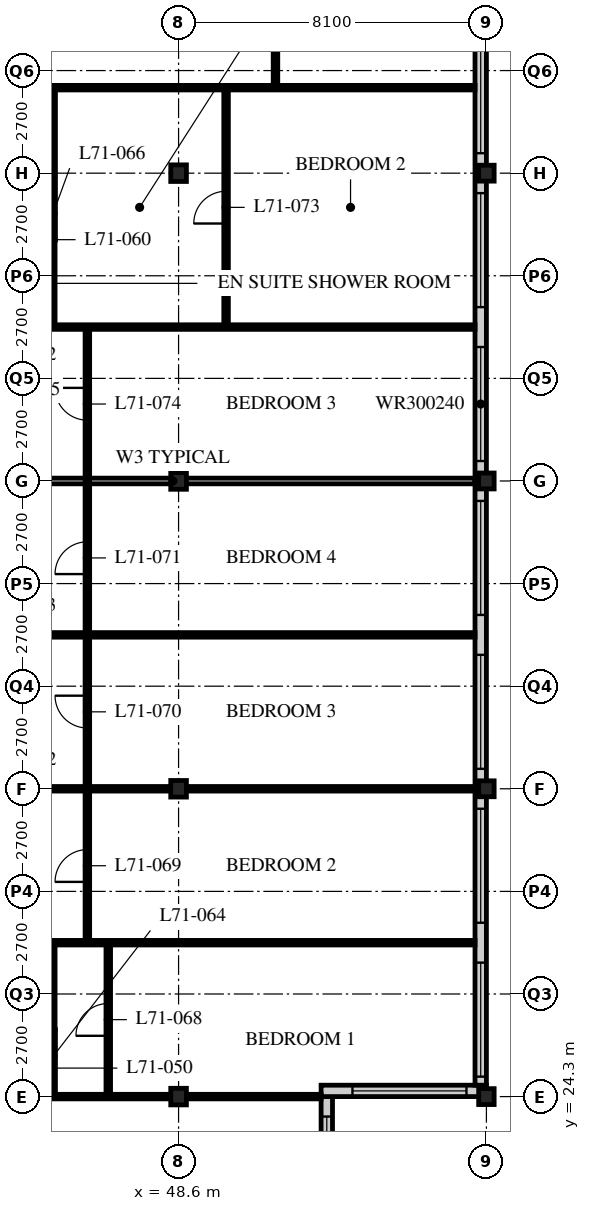
"""IFC4 building model, lengths in metres.
Left out: names, types, materials, properties, quantities, classifications, styles, units other than length and angle.
Written with IfcOpenShell. Run it as: python <this file> out.ifc"""

import sys

from ifc_helpers import new_model, si_unit, direction, frame, frame_2d, origin, origin_2d, place, context, subcontext, project, spatial, rectangle, i_section, extrude, element, fill, save


model = new_model("IFC4")
c1 = context("Model", 3, precision=1e-05, world=origin(), true_north=direction((0.0, 1.0)))
c2 = subcontext(c1, "Body", "Model", "MODEL_VIEW")
j1 = project(units=[si_unit("LENGTHUNIT", "METRE"), si_unit("PLANEANGLEUNIT", "RADIAN")], contexts=[c1])
p1 = place(None, origin())
s1 = spatial("IfcSite", under=j1, at=p1, CompositionType="ELEMENT")
p2 = place(p1, origin())
s2 = spatial("IfcBuilding", under=s1, at=p2, CompositionType="ELEMENT")
p3 = place(p2, frame((0.0, 0.0, 277.5)))
s3 = spatial("IfcBuildingStorey", under=s2, at=p3, CompositionType="ELEMENT", Elevation=277.5)
for number, where, z_axis, x_axis in (
    (1, (48.6, 24.3, 0.0), (0.0, 0.0, 1.0), (1.0, 0.0, 0.0)),
    (2, (48.6, 32.4, 0.0), (0.0, 0.0, 1.0), (1.0, 0.0, 0.0)),
    (3, (48.6, 40.5, 0.0), (0.0, 0.0, 1.0), (1.0, 0.0, 0.0)),
    (4, (48.6, 48.6, 0.0), (0.0, 0.0, 1.0), (1.0, 0.0, 0.0)),
):
    element("IfcColumn", number, at=place(p3, frame(where, z_axis=z_axis, x_axis=x_axis)), inside=s3, PredefinedType="COLUMN", context=c2, shape_type="SweptSolid", body=[
        extrude(i_section(OverallWidth=0.412, OverallDepth=0.437, WebThickness=0.036, FlangeThickness=0.058, FilletRadius=0.015, at=origin_2d()), origin(), (0.0, 0.0, 1.0), 3.9),
    ])
for number, where, z_axis, x_axis in (
    (5, (56.7, 24.3, 0.0), (0.0, 0.0, 1.0), (1.0, 0.0, 0.0)),
    (6, (56.7, 32.4, 0.0), (0.0, 0.0, 1.0), (1.0, 0.0, 0.0)),
    (7, (56.7, 40.5, 0.0), (0.0, 0.0, 1.0), (1.0, 0.0, 0.0)),
    (8, (56.7, 48.6, 0.0), (0.0, 0.0, 1.0), (1.0, 0.0, 0.0)),
):
    element("IfcColumn", number, at=place(p3, frame(where, z_axis=z_axis, x_axis=x_axis)), inside=s3, PredefinedType="COLUMN", context=c2, shape_type="SweptSolid", body=[
        extrude(i_section(OverallWidth=0.407, OverallDepth=0.419, WebThickness=0.031, FlangeThickness=0.049, FilletRadius=0.015, at=origin_2d()), origin(), (0.0, 0.0, 1.0), 3.9),
    ])
p4 = place(p3, frame((52.5, 20.55, 0.0), z_axis=(0.0, 0.0, 1.0), x_axis=(0.0, 1.0, 0.0)))
e9 = element("IfcWall", 9, at=p4, inside=s3, PredefinedType="SOLIDWALL", context=c2, shape_type="SweptSolid", body=[
    extrude(rectangle(XDim=3.75, YDim=0.3, at=frame_2d((1.875, 0.0))), origin(), (0.0, 0.0, 1.0), 3.69),
])
p5 = place(p4, frame((0.225, 0.0, 0.6)))
e10 = element("IfcOpeningElement", 10, at=p5, cuts=e9, PredefinedType="OPENING", context=c2, shape_type="SweptSolid", body=[
    extrude(rectangle(XDim=3.0, YDim=2.3, at=frame_2d((1.5, 1.15))), frame((0.0, 0.16, 0.0), z_axis=(0.0, -1.0, 0.0), x_axis=(1.0, 0.0, 0.0)), (0.0, 0.0, 1.0), 0.32),
])
p6 = place(p3, frame((52.35, 24.45, 0.0), z_axis=(0.0, 0.0, 1.0), x_axis=(1.0, 0.0, 0.0)))
e11 = element("IfcWall", 11, at=p6, inside=s3, PredefinedType="SOLIDWALL", context=c2, shape_type="SweptSolid", body=[
    extrude(rectangle(XDim=4.35, YDim=0.3, at=frame_2d((2.175, 0.0))), origin(), (0.0, 0.0, 1.0), 3.69),
])
p7 = place(p6, frame((0.825, 0.0, 0.6)))
e12 = element("IfcOpeningElement", 12, at=p7, cuts=e11, PredefinedType="OPENING", context=c2, shape_type="SweptSolid", body=[
    extrude(rectangle(XDim=3.0, YDim=2.3, at=frame_2d((1.5, 1.15))), frame((0.0, 0.16, 0.0), z_axis=(0.0, -1.0, 0.0), x_axis=(1.0, 0.0, 0.0)), (0.0, 0.0, 1.0), 0.32),
])
p8 = place(p3, frame((56.55, 24.6, 0.0), z_axis=(0.0, 0.0, 1.0), x_axis=(0.0, 1.0, 0.0)))
e13 = element("IfcWall", 13, at=p8, inside=s3, PredefinedType="SOLIDWALL", context=c2, shape_type="SweptSolid", body=[
    extrude(rectangle(XDim=32.1, YDim=0.3, at=frame_2d((16.05, 0.0))), origin(), (0.0, 0.0, 1.0), 3.69),
])
p9 = place(p8, frame((0.225, 0.0, 0.6)))
e14 = element("IfcOpeningElement", 14, at=p9, cuts=e13, PredefinedType="OPENING", context=c2, shape_type="SweptSolid", body=[
    extrude(rectangle(XDim=3.0, YDim=2.4, at=frame_2d((1.5, 1.2))), frame((0.0, 0.16, 0.0), z_axis=(0.0, -1.0, 0.0), x_axis=(1.0, 0.0, 0.0)), (0.0, 0.0, 1.0), 0.32),
])
p10 = place(p8, frame((4.275, 0.0, 0.6)))
e15 = element("IfcOpeningElement", 15, at=p10, cuts=e13, PredefinedType="OPENING", context=c2, shape_type="SweptSolid", body=[
    extrude(rectangle(XDim=3.0, YDim=2.4, at=frame_2d((1.5, 1.2))), frame((0.0, 0.16, 0.0), z_axis=(0.0, -1.0, 0.0), x_axis=(1.0, 0.0, 0.0)), (0.0, 0.0, 1.0), 0.32),
])
p11 = place(p8, frame((8.325, 0.0, 0.6)))
e16 = element("IfcOpeningElement", 16, at=p11, cuts=e13, PredefinedType="OPENING", context=c2, shape_type="SweptSolid", body=[
    extrude(rectangle(XDim=3.0, YDim=2.4, at=frame_2d((1.5, 1.2))), frame((0.0, 0.16, 0.0), z_axis=(0.0, -1.0, 0.0), x_axis=(1.0, 0.0, 0.0)), (0.0, 0.0, 1.0), 0.32),
])
p12 = place(p8, frame((12.375, 0.0, 0.6)))
e17 = element("IfcOpeningElement", 17, at=p12, cuts=e13, PredefinedType="OPENING", context=c2, shape_type="SweptSolid", body=[
    extrude(rectangle(XDim=3.0, YDim=2.4, at=frame_2d((1.5, 1.2))), frame((0.0, 0.16, 0.0), z_axis=(0.0, -1.0, 0.0), x_axis=(1.0, 0.0, 0.0)), (0.0, 0.0, 1.0), 0.32),
])
p13 = place(p8, frame((16.425, 0.0, 0.6)))
e18 = element("IfcOpeningElement", 18, at=p13, cuts=e13, PredefinedType="OPENING", context=c2, shape_type="SweptSolid", body=[
    extrude(rectangle(XDim=3.0, YDim=2.4, at=frame_2d((1.5, 1.2))), frame((0.0, 0.16, 0.0), z_axis=(0.0, -1.0, 0.0), x_axis=(1.0, 0.0, 0.0)), (0.0, 0.0, 1.0), 0.32),
])
p14 = place(p8, frame((20.475, 0.0, 0.6)))
e19 = element("IfcOpeningElement", 19, at=p14, cuts=e13, PredefinedType="OPENING", context=c2, shape_type="SweptSolid", body=[
    extrude(rectangle(XDim=3.0, YDim=2.4, at=frame_2d((1.5, 1.2))), frame((0.0, 0.16, 0.0), z_axis=(0.0, -1.0, 0.0), x_axis=(1.0, 0.0, 0.0)), (0.0, 0.0, 1.0), 0.32),
])
p15 = place(p8, frame((24.525, 0.0, 0.6)))
e20 = element("IfcOpeningElement", 20, at=p15, cuts=e13, PredefinedType="OPENING", context=c2, shape_type="SweptSolid", body=[
    extrude(rectangle(XDim=3.0, YDim=2.4, at=frame_2d((1.5, 1.2))), frame((0.0, 0.16, 0.0), z_axis=(0.0, -1.0, 0.0), x_axis=(1.0, 0.0, 0.0)), (0.0, 0.0, 1.0), 0.32),
])
p16 = place(p8, frame((28.575, 0.0, 0.6)))
e21 = element("IfcOpeningElement", 21, at=p16, cuts=e13, PredefinedType="OPENING", context=c2, shape_type="SweptSolid", body=[
    extrude(rectangle(XDim=3.0, YDim=2.4, at=frame_2d((1.5, 1.2))), frame((0.0, 0.16, 0.0), z_axis=(0.0, -1.0, 0.0), x_axis=(1.0, 0.0, 0.0)), (0.0, 0.0, 1.0), 0.32),
])
p17 = place(p3, frame((42.9, 24.3, 0.0), z_axis=(0.0, 0.0, 1.0), x_axis=(1.0, 0.0, 0.0)))
e22 = element("IfcWall", 22, at=p17, inside=s3, PredefinedType="PARTITIONING", context=c2, shape_type="SweptSolid", body=[
    extrude(rectangle(XDim=9.45, YDim=0.12, at=frame_2d((4.725, 0.0))), origin(), (0.0, 0.0, 1.0), 3.078),
])
p18 = place(p3, frame((40.5, 40.5, 0.0), z_axis=(0.0, 0.0, 1.0), x_axis=(1.0, 0.0, 0.0)))
e23 = element("IfcWall", 23, at=p18, inside=s3, PredefinedType="PARTITIONING", context=c2, shape_type="SweptSolid", body=[
    extrude(rectangle(XDim=15.9, YDim=0.15, at=frame_2d((7.95, 0.0))), origin(), (0.0, 0.0, 1.0), 3.078),
])
p19 = place(p3, frame((42.9, 26.05, 0.0), z_axis=(0.0, 0.0, 1.0), x_axis=(1.0, 0.0, 0.0)))
e24 = element("IfcWall", 24, at=p19, inside=s3, PredefinedType="PARTITIONING", context=c2, shape_type="SweptSolid", body=[
    extrude(rectangle(XDim=2.4, YDim=0.1, at=frame_2d((1.2, 0.0))), origin(), (0.0, 0.0, 1.0), 3.69),
])
p20 = place(p19, frame((0.8, 0.0, 0.0)))
e25 = element("IfcOpeningElement", 25, at=p20, cuts=e24, PredefinedType="OPENING", context=c2, shape_type="SweptSolid", body=[
    extrude(rectangle(XDim=0.8, YDim=2.1, at=frame_2d((0.4, 1.05))), frame((0.0, 0.06, 0.0), z_axis=(0.0, -1.0, 0.0), x_axis=(1.0, 0.0, 0.0)), (0.0, 0.0, 1.0), 0.12),
])
p21 = place(p3, frame((45.3, 26.05, 0.0), z_axis=(0.0, 0.0, 1.0), x_axis=(0.0, 1.0, 0.0)))
e26 = element("IfcWall", 26, at=p21, inside=s3, PredefinedType="PARTITIONING", context=c2, shape_type="SweptSolid", body=[
    extrude(rectangle(XDim=2.3, YDim=0.1, at=frame_2d((1.15, 0.0))), origin(), (0.0, 0.0, 1.0), 3.69),
])
p22 = place(p3, frame((42.9, 28.35, 0.0), z_axis=(0.0, 0.0, 1.0), x_axis=(1.0, 0.0, 0.0)))
e27 = element("IfcWall", 27, at=p22, inside=s3, PredefinedType="PARTITIONING", context=c2, shape_type="SweptSolid", body=[
    extrude(rectangle(XDim=13.5, YDim=0.12, at=frame_2d((6.75, 0.0))), origin(), (0.0, 0.0, 1.0), 3.69),
])
p23 = place(p3, frame((42.9, 32.4, 0.0), z_axis=(0.0, 0.0, 1.0), x_axis=(1.0, 0.0, 0.0)))
e28 = element("IfcWall", 28, at=p23, inside=s3, PredefinedType="PARTITIONING", context=c2, shape_type="SweptSolid", body=[
    extrude(rectangle(XDim=13.5, YDim=0.12, at=frame_2d((6.75, 0.0))), origin(), (0.0, 0.0, 1.0), 3.078),
])
for number, where, z_axis, x_axis in (
    (29, (42.9, 36.45, 0.0), (0.0, 0.0, 1.0), (1.0, 0.0, 0.0)),
    (30, (42.9, 50.85, 0.0), (0.0, 0.0, 1.0), (1.0, 0.0, 0.0)),
):
    element("IfcWall", number, at=place(p3, frame(where, z_axis=z_axis, x_axis=x_axis)), inside=s3, PredefinedType="PARTITIONING", context=c2, shape_type="SweptSolid", body=[
        extrude(rectangle(XDim=13.5, YDim=0.12, at=frame_2d((6.75, 0.0))), origin(), (0.0, 0.0, 1.0), 3.69),
    ])
p24 = place(p3, frame((42.9, 46.85, 0.0), z_axis=(0.0, 0.0, 1.0), x_axis=(1.0, 0.0, 0.0)))
e31 = element("IfcWall", 31, at=p24, inside=s3, PredefinedType="PARTITIONING", context=c2, shape_type="SweptSolid", body=[
    extrude(rectangle(XDim=2.4, YDim=0.1, at=frame_2d((1.2, 0.0))), origin(), (0.0, 0.0, 1.0), 3.69),
])
p25 = place(p24, frame((0.8, 0.0, 0.0)))
e32 = element("IfcOpeningElement", 32, at=p25, cuts=e31, PredefinedType="OPENING", context=c2, shape_type="SweptSolid", body=[
    extrude(rectangle(XDim=0.8, YDim=2.1, at=frame_2d((0.4, 1.05))), frame((0.0, 0.06, 0.0), z_axis=(0.0, -1.0, 0.0), x_axis=(1.0, 0.0, 0.0)), (0.0, 0.0, 1.0), 0.12),
])
p26 = place(p3, frame((45.3, 46.85, 0.0), z_axis=(0.0, 0.0, 1.0), x_axis=(0.0, -1.0, 0.0)))
e33 = element("IfcWall", 33, at=p26, inside=s3, PredefinedType="PARTITIONING", context=c2, shape_type="SweptSolid", body=[
    extrude(rectangle(XDim=2.3, YDim=0.1, at=frame_2d((1.15, 0.0))), origin(), (0.0, 0.0, 1.0), 3.69),
])
p27 = place(p3, frame((42.9, 44.55, 0.0), z_axis=(0.0, 0.0, 1.0), x_axis=(1.0, 0.0, 0.0)))
e34 = element("IfcWall", 34, at=p27, inside=s3, PredefinedType="PARTITIONING", context=c2, shape_type="SweptSolid", body=[
    extrude(rectangle(XDim=13.5, YDim=0.12, at=frame_2d((6.75, 0.0))), origin(), (0.0, 0.0, 1.0), 3.69),
])
p28 = place(p3, frame((45.3, 24.3, 0.0), z_axis=(0.0, 0.0, 1.0), x_axis=(0.0, 1.0, 0.0)))
e35 = element("IfcWall", 35, at=p28, inside=s3, PredefinedType="PARTITIONING", context=c2, shape_type="SweptSolid", body=[
    extrude(rectangle(XDim=1.76, YDim=0.12, at=frame_2d((0.88, 0.0))), origin(), (0.0, 0.0, 1.0), 3.69),
])
p29 = place(p28, frame((0.635, 0.0, 0.0)))
e36 = element("IfcOpeningElement", 36, at=p29, cuts=e35, PredefinedType="OPENING", context=c2, shape_type="SweptSolid", body=[
    extrude(rectangle(XDim=0.85, YDim=2.1, at=frame_2d((0.425, 1.05))), frame((0.0, 0.07, 0.0), z_axis=(0.0, -1.0, 0.0), x_axis=(1.0, 0.0, 0.0)), (0.0, 0.0, 1.0), 0.14),
])
p30 = place(p3, frame((45.3, 50.85, 0.0), z_axis=(0.0, 0.0, 1.0), x_axis=(0.0, -1.0, 0.0)))
e37 = element("IfcWall", 37, at=p30, inside=s3, PredefinedType="PARTITIONING", context=c2, shape_type="SweptSolid", body=[
    extrude(rectangle(XDim=4.01, YDim=0.12, at=frame_2d((2.005, 0.0))), origin(), (0.0, 0.0, 1.0), 3.69),
])
p31 = place(p30, frame((2.885, 0.0, 0.0)))
e38 = element("IfcOpeningElement", 38, at=p31, cuts=e37, PredefinedType="OPENING", context=c2, shape_type="SweptSolid", body=[
    extrude(rectangle(XDim=0.85, YDim=2.1, at=frame_2d((0.425, 1.05))), frame((0.0, 0.07, 0.0), z_axis=(0.0, -1.0, 0.0), x_axis=(1.0, 0.0, 0.0)), (0.0, 0.0, 1.0), 0.14),
])
p32 = place(p3, frame((46.75, 24.3, 0.0), z_axis=(0.0, 0.0, 1.0), x_axis=(0.0, 1.0, 0.0)))
e39 = element("IfcWall", 39, at=p32, inside=s3, PredefinedType="PARTITIONING", context=c2, shape_type="SweptSolid", body=[
    extrude(rectangle(XDim=4.05, YDim=0.12, at=frame_2d((2.025, 0.0))), origin(), (0.0, 0.0, 1.0), 3.69),
])
p33 = place(p32, frame((1.6, 0.0, 0.0)))
e40 = element("IfcOpeningElement", 40, at=p33, cuts=e39, PredefinedType="OPENING", context=c2, shape_type="SweptSolid", body=[
    extrude(rectangle(XDim=0.85, YDim=2.1, at=frame_2d((0.425, 1.05))), frame((0.0, 0.07, 0.0), z_axis=(0.0, -1.0, 0.0), x_axis=(1.0, 0.0, 0.0)), (0.0, 0.0, 1.0), 0.14),
])
p34 = place(p3, frame((46.2, 28.35, 0.0), z_axis=(0.0, 0.0, 1.0), x_axis=(0.0, 1.0, 0.0)))
e41 = element("IfcWall", 41, at=p34, inside=s3, PredefinedType="PARTITIONING", context=c2, shape_type="SweptSolid", body=[
    extrude(rectangle(XDim=16.2, YDim=0.12, at=frame_2d((8.1, 0.0))), origin(), (0.0, 0.0, 1.0), 3.69),
])
p35 = place(p34, frame((1.6, 0.0, 0.0)))
e42 = element("IfcOpeningElement", 42, at=p35, cuts=e41, PredefinedType="OPENING", context=c2, shape_type="SweptSolid", body=[
    extrude(rectangle(XDim=0.85, YDim=2.1, at=frame_2d((0.425, 1.05))), frame((0.0, 0.07, 0.0), z_axis=(0.0, -1.0, 0.0), x_axis=(1.0, 0.0, 0.0)), (0.0, 0.0, 1.0), 0.14),
])
p36 = place(p34, frame((5.65, 0.0, 0.0)))
e43 = element("IfcOpeningElement", 43, at=p36, cuts=e41, PredefinedType="OPENING", context=c2, shape_type="SweptSolid", body=[
    extrude(rectangle(XDim=0.85, YDim=2.1, at=frame_2d((0.425, 1.05))), frame((0.0, 0.07, 0.0), z_axis=(0.0, -1.0, 0.0), x_axis=(1.0, 0.0, 0.0)), (0.0, 0.0, 1.0), 0.14),
])
p37 = place(p34, frame((9.7, 0.0, 0.0)))
e44 = element("IfcOpeningElement", 44, at=p37, cuts=e41, PredefinedType="OPENING", context=c2, shape_type="SweptSolid", body=[
    extrude(rectangle(XDim=0.85, YDim=2.1, at=frame_2d((0.425, 1.05))), frame((0.0, 0.07, 0.0), z_axis=(0.0, -1.0, 0.0), x_axis=(1.0, 0.0, 0.0)), (0.0, 0.0, 1.0), 0.14),
])
p38 = place(p34, frame((13.75, 0.0, 0.0)))
e45 = element("IfcOpeningElement", 45, at=p38, cuts=e41, PredefinedType="OPENING", context=c2, shape_type="SweptSolid", body=[
    extrude(rectangle(XDim=0.85, YDim=2.1, at=frame_2d((0.425, 1.05))), frame((0.0, 0.07, 0.0), z_axis=(0.0, -1.0, 0.0), x_axis=(1.0, 0.0, 0.0)), (0.0, 0.0, 1.0), 0.14),
])
p39 = place(p3, frame((51.15, 50.85, 0.0), z_axis=(0.0, 0.0, 1.0), x_axis=(0.0, 1.0, 0.0)))
e46 = element("IfcWall", 46, at=p39, inside=s3, PredefinedType="PARTITIONING", context=c2, shape_type="SweptSolid", body=[
    extrude(rectangle(XDim=7.8, YDim=0.12, at=frame_2d((3.9, 0.0))), origin(), (0.0, 0.0, 1.0), 3.69),
])
p40 = place(p39, frame((3.475, 0.0, 0.0)))
e47 = element("IfcOpeningElement", 47, at=p40, cuts=e46, PredefinedType="OPENING", context=c2, shape_type="SweptSolid", body=[
    extrude(rectangle(XDim=0.85, YDim=2.1, at=frame_2d((0.425, 1.05))), frame((0.0, 0.07, 0.0), z_axis=(0.0, -1.0, 0.0), x_axis=(1.0, 0.0, 0.0)), (0.0, 0.0, 1.0), 0.14),
])
p41 = place(p3, frame((49.85, 44.55, 0.0), z_axis=(0.0, 0.0, 1.0), x_axis=(0.0, 1.0, 0.0)))
e48 = element("IfcWall", 48, at=p41, inside=s3, PredefinedType="PARTITIONING", context=c2, shape_type="SweptSolid", body=[
    extrude(rectangle(XDim=6.3, YDim=0.12, at=frame_2d((3.15, 0.0))), origin(), (0.0, 0.0, 1.0), 3.69),
])
p42 = place(p41, frame((2.725, 0.0, 0.0)))
e49 = element("IfcOpeningElement", 49, at=p42, cuts=e48, PredefinedType="OPENING", context=c2, shape_type="SweptSolid", body=[
    extrude(rectangle(XDim=0.85, YDim=2.1, at=frame_2d((0.425, 1.05))), frame((0.0, 0.07, 0.0), z_axis=(0.0, -1.0, 0.0), x_axis=(1.0, 0.0, 0.0)), (0.0, 0.0, 1.0), 0.14),
])
p43 = place(p5, origin())
e50 = element("IfcWindow", 50, at=p43, inside=s3, PartitioningType="SINGLE_PANEL", PredefinedType="WINDOW", context=c2, shape_type="SweptSolid", body=[
    extrude(rectangle(XDim=3.0, YDim=2.3, at=frame_2d((1.5, 1.15))), frame((0.0, 0.03, 0.0), z_axis=(0.0, -1.0, 0.0), x_axis=(1.0, 0.0, 0.0)), (0.0, 0.0, 1.0), 0.06),
])
fill(e10, e50)
p44 = place(p7, origin())
e51 = element("IfcWindow", 51, at=p44, inside=s3, PartitioningType="SINGLE_PANEL", PredefinedType="WINDOW", context=c2, shape_type="SweptSolid", body=[
    extrude(rectangle(XDim=3.0, YDim=2.3, at=frame_2d((1.5, 1.15))), frame((0.0, 0.03, 0.0), z_axis=(0.0, -1.0, 0.0), x_axis=(1.0, 0.0, 0.0)), (0.0, 0.0, 1.0), 0.06),
])
fill(e12, e51)
p45 = place(p9, origin())
e52 = element("IfcWindow", 52, at=p45, inside=s3, PartitioningType="SINGLE_PANEL", PredefinedType="WINDOW", context=c2, shape_type="SweptSolid", body=[
    extrude(rectangle(XDim=3.0, YDim=2.4, at=frame_2d((1.5, 1.2))), frame((0.0, 0.03, 0.0), z_axis=(0.0, -1.0, 0.0), x_axis=(1.0, 0.0, 0.0)), (0.0, 0.0, 1.0), 0.06),
])
fill(e14, e52)
p46 = place(p10, origin())
e53 = element("IfcWindow", 53, at=p46, inside=s3, PartitioningType="SINGLE_PANEL", PredefinedType="WINDOW", context=c2, shape_type="SweptSolid", body=[
    extrude(rectangle(XDim=3.0, YDim=2.4, at=frame_2d((1.5, 1.2))), frame((0.0, 0.03, 0.0), z_axis=(0.0, -1.0, 0.0), x_axis=(1.0, 0.0, 0.0)), (0.0, 0.0, 1.0), 0.06),
])
fill(e15, e53)
p47 = place(p11, origin())
e54 = element("IfcWindow", 54, at=p47, inside=s3, PartitioningType="SINGLE_PANEL", PredefinedType="WINDOW", context=c2, shape_type="SweptSolid", body=[
    extrude(rectangle(XDim=3.0, YDim=2.4, at=frame_2d((1.5, 1.2))), frame((0.0, 0.03, 0.0), z_axis=(0.0, -1.0, 0.0), x_axis=(1.0, 0.0, 0.0)), (0.0, 0.0, 1.0), 0.06),
])
fill(e16, e54)
p48 = place(p12, origin())
e55 = element("IfcWindow", 55, at=p48, inside=s3, PartitioningType="SINGLE_PANEL", PredefinedType="WINDOW", context=c2, shape_type="SweptSolid", body=[
    extrude(rectangle(XDim=3.0, YDim=2.4, at=frame_2d((1.5, 1.2))), frame((0.0, 0.03, 0.0), z_axis=(0.0, -1.0, 0.0), x_axis=(1.0, 0.0, 0.0)), (0.0, 0.0, 1.0), 0.06),
])
fill(e17, e55)
p49 = place(p13, origin())
e56 = element("IfcWindow", 56, at=p49, inside=s3, PartitioningType="SINGLE_PANEL", PredefinedType="WINDOW", context=c2, shape_type="SweptSolid", body=[
    extrude(rectangle(XDim=3.0, YDim=2.4, at=frame_2d((1.5, 1.2))), frame((0.0, 0.03, 0.0), z_axis=(0.0, -1.0, 0.0), x_axis=(1.0, 0.0, 0.0)), (0.0, 0.0, 1.0), 0.06),
])
fill(e18, e56)
p50 = place(p14, origin())
e57 = element("IfcWindow", 57, at=p50, inside=s3, PartitioningType="SINGLE_PANEL", PredefinedType="WINDOW", context=c2, shape_type="SweptSolid", body=[
    extrude(rectangle(XDim=3.0, YDim=2.4, at=frame_2d((1.5, 1.2))), frame((0.0, 0.03, 0.0), z_axis=(0.0, -1.0, 0.0), x_axis=(1.0, 0.0, 0.0)), (0.0, 0.0, 1.0), 0.06),
])
fill(e19, e57)
p51 = place(p15, origin())
e58 = element("IfcWindow", 58, at=p51, inside=s3, PartitioningType="SINGLE_PANEL", PredefinedType="WINDOW", context=c2, shape_type="SweptSolid", body=[
    extrude(rectangle(XDim=3.0, YDim=2.4, at=frame_2d((1.5, 1.2))), frame((0.0, 0.03, 0.0), z_axis=(0.0, -1.0, 0.0), x_axis=(1.0, 0.0, 0.0)), (0.0, 0.0, 1.0), 0.06),
])
fill(e20, e58)
p52 = place(p29, origin())
e59 = element("IfcDoor", 59, at=p52, inside=s3, OperationType="SINGLE_SWING_RIGHT", PredefinedType="DOOR", context=c2, shape_type="SweptSolid", body=[
    extrude(rectangle(XDim=0.85, YDim=2.1, at=frame_2d((0.425, 1.05))), frame((0.0, 0.025, 0.0), z_axis=(0.0, -1.0, 0.0), x_axis=(1.0, 0.0, 0.0)), (0.0, 0.0, 1.0), 0.05),
])
fill(e36, e59)
p53 = place(p31, origin())
e60 = element("IfcDoor", 60, at=p53, inside=s3, OperationType="SINGLE_SWING_LEFT", PredefinedType="DOOR", context=c2, shape_type="SweptSolid", body=[
    extrude(rectangle(XDim=0.85, YDim=2.1, at=frame_2d((0.425, 1.05))), frame((0.0, 0.025, 0.0), z_axis=(0.0, -1.0, 0.0), x_axis=(1.0, 0.0, 0.0)), (0.0, 0.0, 1.0), 0.05),
])
fill(e38, e60)
p54 = place(p33, origin())
e61 = element("IfcDoor", 61, at=p54, inside=s3, OperationType="SINGLE_SWING_LEFT", PredefinedType="DOOR", context=c2, shape_type="SweptSolid", body=[
    extrude(rectangle(XDim=0.85, YDim=2.1, at=frame_2d((0.425, 1.05))), frame((0.0, 0.025, 0.0), z_axis=(0.0, -1.0, 0.0), x_axis=(1.0, 0.0, 0.0)), (0.0, 0.0, 1.0), 0.05),
])
fill(e40, e61)
p55 = place(p35, origin())
e62 = element("IfcDoor", 62, at=p55, inside=s3, OperationType="SINGLE_SWING_LEFT", PredefinedType="DOOR", context=c2, shape_type="SweptSolid", body=[
    extrude(rectangle(XDim=0.85, YDim=2.1, at=frame_2d((0.425, 1.05))), frame((0.0, 0.025, 0.0), z_axis=(0.0, -1.0, 0.0), x_axis=(1.0, 0.0, 0.0)), (0.0, 0.0, 1.0), 0.05),
])
fill(e42, e62)
p56 = place(p36, origin())
e63 = element("IfcDoor", 63, at=p56, inside=s3, OperationType="SINGLE_SWING_RIGHT", PredefinedType="DOOR", context=c2, shape_type="SweptSolid", body=[
    extrude(rectangle(XDim=0.85, YDim=2.1, at=frame_2d((0.425, 1.05))), frame((0.0, 0.025, 0.0), z_axis=(0.0, -1.0, 0.0), x_axis=(1.0, 0.0, 0.0)), (0.0, 0.0, 1.0), 0.05),
])
fill(e43, e63)
p57 = place(p37, origin())
e64 = element("IfcDoor", 64, at=p57, inside=s3, OperationType="SINGLE_SWING_LEFT", PredefinedType="DOOR", context=c2, shape_type="SweptSolid", body=[
    extrude(rectangle(XDim=0.85, YDim=2.1, at=frame_2d((0.425, 1.05))), frame((0.0, 0.025, 0.0), z_axis=(0.0, -1.0, 0.0), x_axis=(1.0, 0.0, 0.0)), (0.0, 0.0, 1.0), 0.05),
])
fill(e44, e64)
p58 = place(p42, origin())
e65 = element("IfcDoor", 65, at=p58, inside=s3, OperationType="SINGLE_SWING_LEFT", PredefinedType="DOOR", context=c2, shape_type="SweptSolid", body=[
    extrude(rectangle(XDim=0.85, YDim=2.1, at=frame_2d((0.425, 1.05))), frame((0.0, 0.025, 0.0), z_axis=(0.0, -1.0, 0.0), x_axis=(1.0, 0.0, 0.0)), (0.0, 0.0, 1.0), 0.05),
])
fill(e49, e65)
p59 = place(p38, origin())
e66 = element("IfcDoor", 66, at=p59, inside=s3, OperationType="SINGLE_SWING_RIGHT", PredefinedType="DOOR", context=c2, shape_type="SweptSolid", body=[
    extrude(rectangle(XDim=0.85, YDim=2.1, at=frame_2d((0.425, 1.05))), frame((0.0, 0.025, 0.0), z_axis=(0.0, -1.0, 0.0), x_axis=(1.0, 0.0, 0.0)), (0.0, 0.0, 1.0), 0.05),
])
fill(e45, e66)
save(model, sys.argv[1])
